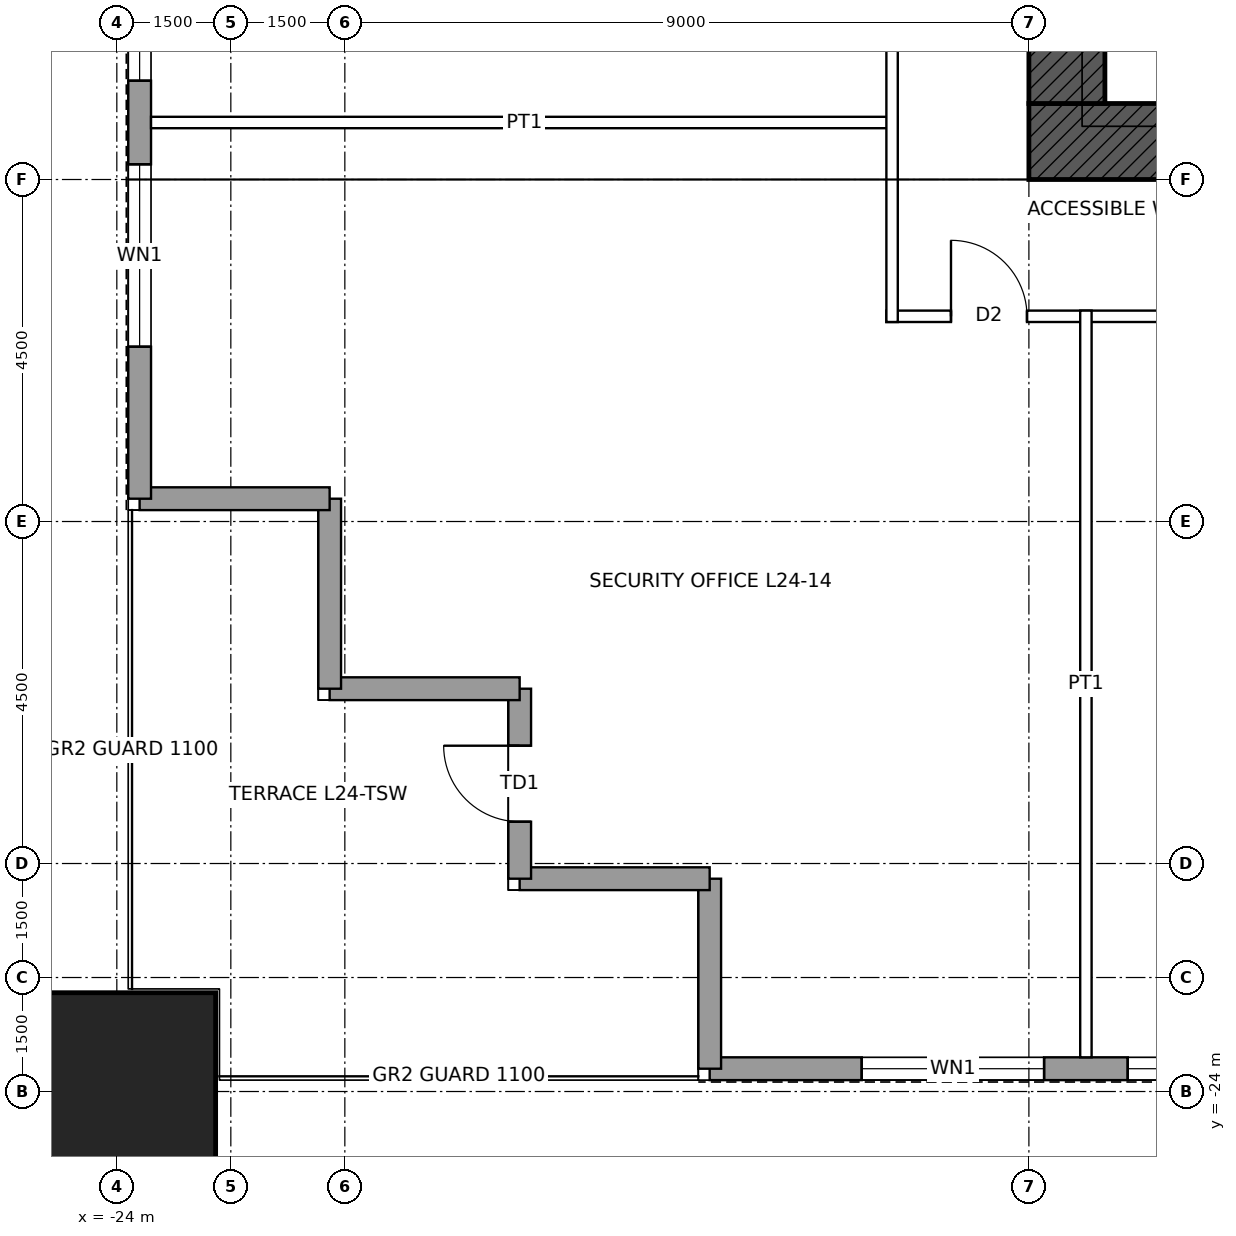
"""IFC4 building model, lengths in metres.
Left out: names, types, materials, properties, quantities, classifications, styles, units other than length and angle.
Written with IfcOpenShell. Run it as: python <this file> out.ifc"""

import sys

from ifc_helpers import new_model, si_unit, direction, frame, frame_2d, origin, origin_2d, place, context, subcontext, project, spatial, rectangle, hollow_rectangle, extrude, element, fill, save


model = new_model("IFC4")
c1 = context("Model", 3, precision=1e-05, world=origin(), true_north=direction((0.0, 1.0)))
c2 = subcontext(c1, "Body", "Model", "MODEL_VIEW")
j1 = project(units=[si_unit("LENGTHUNIT", "METRE"), si_unit("PLANEANGLEUNIT", "RADIAN")], contexts=[c1])
p1 = place(None, origin())
s1 = spatial("IfcSite", under=j1, at=p1, CompositionType="ELEMENT")
p2 = place(p1, origin())
s2 = spatial("IfcBuilding", under=s1, at=p2, CompositionType="ELEMENT")
p3 = place(p2, frame((0.0, 0.0, 122.4)))
s3 = spatial("IfcBuildingStorey", under=s2, at=p3, CompositionType="ELEMENT", Elevation=122.4)
p4 = place(p3, frame((-24.0, -24.0, 0.0), z_axis=(0.0, 0.0, 1.0), x_axis=(1.0, 0.0, 0.0)))
e1 = element("IfcColumn", 1, at=p4, inside=s3, PredefinedType="COLUMN", context=c2, shape_type="SweptSolid", body=[
    extrude(hollow_rectangle(XDim=2.6, YDim=2.6, WallThickness=0.13, at=origin_2d()), origin(), (0.0, 0.0, 1.0), 4.5),
])
p5 = place(p3, frame((12.0, -11.5, 0.0), z_axis=(0.0, 0.0, 1.0), x_axis=(-1.0, 0.0, 0.0)))
e2 = element("IfcWall", 2, at=p5, inside=s3, PredefinedType="SHEAR", context=c2, shape_type="SweptSolid", body=[
    extrude(rectangle(XDim=24.0, YDim=1.0, at=frame_2d((12.0, 0.0))), origin(), (0.0, 0.0, 1.0), 4.5),
])
p6 = place(p5, frame((11.5, 0.0, 0.0)))
e3 = element("IfcOpeningElement", 3, at=p6, cuts=e2, PredefinedType="OPENING", context=c2, shape_type="SweptSolid", body=[
    extrude(rectangle(XDim=1.0, YDim=2.1, at=frame_2d((0.5, 1.05))), frame((0.0, 0.51, 0.0), z_axis=(0.0, -1.0, 0.0), x_axis=(1.0, 0.0, 0.0)), (0.0, 0.0, 1.0), 1.02),
])
p7 = place(p5, frame((1.0, 0.0, 0.0)))
e4 = element("IfcOpeningElement", 4, at=p7, cuts=e2, PredefinedType="OPENING", context=c2, shape_type="SweptSolid", body=[
    extrude(rectangle(XDim=1.0, YDim=2.4, at=frame_2d((0.5, 1.2))), frame((0.0, 0.51, 0.0), z_axis=(0.0, -1.0, 0.0), x_axis=(1.0, 0.0, 0.0)), (0.0, 0.0, 1.0), 1.02),
])
p8 = place(p3, frame((-11.5, -11.0, 0.0), z_axis=(0.0, 0.0, 1.0), x_axis=(0.0, 1.0, 0.0)))
e5 = element("IfcWall", 5, at=p8, inside=s3, PredefinedType="SHEAR", context=c2, shape_type="SweptSolid", body=[
    extrude(rectangle(XDim=22.0, YDim=1.0, at=frame_2d((11.0, 0.0))), origin(), (0.0, 0.0, 1.0), 4.5),
])
p9 = place(p8, frame((10.5, 0.0, 0.0)))
e6 = element("IfcOpeningElement", 6, at=p9, cuts=e5, PredefinedType="OPENING", context=c2, shape_type="SweptSolid", body=[
    extrude(rectangle(XDim=1.0, YDim=2.4, at=frame_2d((0.5, 1.2))), frame((0.0, 0.51, 0.0), z_axis=(0.0, -1.0, 0.0), x_axis=(1.0, 0.0, 0.0)), (0.0, 0.0, 1.0), 1.02),
])
p10 = place(p3, frame((16.2, -23.7, 0.0), z_axis=(0.0, 0.0, 1.0), x_axis=(-1.0, 0.0, 0.0)))
e7 = element("IfcWall", 7, at=p10, inside=s3, PredefinedType="SOLIDWALL", context=c2, shape_type="SweptSolid", body=[
    extrude(rectangle(XDim=32.4, YDim=0.3, at=frame_2d((16.2, 0.0))), origin(), (0.0, 0.0, 1.0), 4.3),
])
p11 = place(p10, frame((2.0, 0.0, 1.0)))
e8 = element("IfcOpeningElement", 8, at=p11, cuts=e7, PredefinedType="OPENING", context=c2, shape_type="SweptSolid", body=[
    extrude(rectangle(XDim=2.4, YDim=1.2, at=frame_2d((1.2, 0.6))), frame((0.0, 0.16, 0.0), z_axis=(0.0, -1.0, 0.0), x_axis=(1.0, 0.0, 0.0)), (0.0, 0.0, 1.0), 0.32),
])
p12 = place(p10, frame((5.5, 0.0, 1.0)))
e9 = element("IfcOpeningElement", 9, at=p12, cuts=e7, PredefinedType="OPENING", context=c2, shape_type="SweptSolid", body=[
    extrude(rectangle(XDim=2.4, YDim=1.2, at=frame_2d((1.2, 0.6))), frame((0.0, 0.16, 0.0), z_axis=(0.0, -1.0, 0.0), x_axis=(1.0, 0.0, 0.0)), (0.0, 0.0, 1.0), 0.32),
])
p13 = place(p10, frame((8.6, 0.0, 1.0)))
e10 = element("IfcOpeningElement", 10, at=p13, cuts=e7, PredefinedType="OPENING", context=c2, shape_type="SweptSolid", body=[
    extrude(rectangle(XDim=2.4, YDim=1.2, at=frame_2d((1.2, 0.6))), frame((0.0, 0.16, 0.0), z_axis=(0.0, -1.0, 0.0), x_axis=(1.0, 0.0, 0.0)), (0.0, 0.0, 1.0), 0.32),
])
p14 = place(p10, frame((13.65, 0.0, 1.0)))
e11 = element("IfcOpeningElement", 11, at=p14, cuts=e7, PredefinedType="OPENING", context=c2, shape_type="SweptSolid", body=[
    extrude(rectangle(XDim=2.4, YDim=1.2, at=frame_2d((1.2, 0.6))), frame((0.0, 0.16, 0.0), z_axis=(0.0, -1.0, 0.0), x_axis=(1.0, 0.0, 0.0)), (0.0, 0.0, 1.0), 0.32),
])
p15 = place(p10, frame((16.35, 0.0, 1.0)))
e12 = element("IfcOpeningElement", 12, at=p15, cuts=e7, PredefinedType="OPENING", context=c2, shape_type="SweptSolid", body=[
    extrude(rectangle(XDim=2.4, YDim=1.2, at=frame_2d((1.2, 0.6))), frame((0.0, 0.16, 0.0), z_axis=(0.0, -1.0, 0.0), x_axis=(1.0, 0.0, 0.0)), (0.0, 0.0, 1.0), 0.32),
])
p16 = place(p10, frame((21.4, 0.0, 1.0)))
e13 = element("IfcOpeningElement", 13, at=p16, cuts=e7, PredefinedType="OPENING", context=c2, shape_type="SweptSolid", body=[
    extrude(rectangle(XDim=2.4, YDim=1.2, at=frame_2d((1.2, 0.6))), frame((0.0, 0.16, 0.0), z_axis=(0.0, -1.0, 0.0), x_axis=(1.0, 0.0, 0.0)), (0.0, 0.0, 1.0), 0.32),
])
p17 = place(p10, frame((24.5, 0.0, 1.0)))
e14 = element("IfcOpeningElement", 14, at=p17, cuts=e7, PredefinedType="OPENING", context=c2, shape_type="SweptSolid", body=[
    extrude(rectangle(XDim=2.4, YDim=1.2, at=frame_2d((1.2, 0.6))), frame((0.0, 0.16, 0.0), z_axis=(0.0, -1.0, 0.0), x_axis=(1.0, 0.0, 0.0)), (0.0, 0.0, 1.0), 0.32),
])
p18 = place(p10, frame((28.0, 0.0, 1.0)))
e15 = element("IfcOpeningElement", 15, at=p18, cuts=e7, PredefinedType="OPENING", context=c2, shape_type="SweptSolid", body=[
    extrude(rectangle(XDim=2.4, YDim=1.2, at=frame_2d((1.2, 0.6))), frame((0.0, 0.16, 0.0), z_axis=(0.0, -1.0, 0.0), x_axis=(1.0, 0.0, 0.0)), (0.0, 0.0, 1.0), 0.32),
])
for number, where, z_axis, x_axis in (
    (16, (-16.2, -23.7, 0.0), (0.0, 0.0, 1.0), (0.0, 1.0, 0.0)),
    (17, (-16.2, -21.2, 0.0), (0.0, 0.0, 1.0), (-1.0, 0.0, 0.0)),
):
    element("IfcWall", number, at=place(p3, frame(where, z_axis=z_axis, x_axis=x_axis)), inside=s3, PredefinedType="SOLIDWALL", context=c2, shape_type="SweptSolid", body=[
        extrude(rectangle(XDim=2.5, YDim=0.3, at=frame_2d((1.25, 0.0))), origin(), (0.0, 0.0, 1.0), 4.3),
    ])
p19 = place(p3, frame((-18.7, -21.2, 0.0), z_axis=(0.0, 0.0, 1.0), x_axis=(0.0, 1.0, 0.0)))
e18 = element("IfcWall", 18, at=p19, inside=s3, PredefinedType="SOLIDWALL", context=c2, shape_type="SweptSolid", body=[
    extrude(rectangle(XDim=2.5, YDim=0.3, at=frame_2d((1.25, 0.0))), origin(), (0.0, 0.0, 1.0), 4.3),
])
p20 = place(p19, frame((0.75, 0.0, 0.0)))
e19 = element("IfcOpeningElement", 19, at=p20, cuts=e18, PredefinedType="OPENING", context=c2, shape_type="SweptSolid", body=[
    extrude(rectangle(XDim=1.0, YDim=2.4, at=frame_2d((0.5, 1.2))), frame((0.0, 0.16, 0.0), z_axis=(0.0, -1.0, 0.0), x_axis=(1.0, 0.0, 0.0)), (0.0, 0.0, 1.0), 0.32),
])
for number, where, z_axis, x_axis in (
    (20, (-18.7, -18.7, 0.0), (0.0, 0.0, 1.0), (-1.0, 0.0, 0.0)),
    (21, (-21.2, -18.7, 0.0), (0.0, 0.0, 1.0), (0.0, 1.0, 0.0)),
    (22, (-21.2, -16.2, 0.0), (0.0, 0.0, 1.0), (-1.0, 0.0, 0.0)),
):
    element("IfcWall", number, at=place(p3, frame(where, z_axis=z_axis, x_axis=x_axis)), inside=s3, PredefinedType="SOLIDWALL", context=c2, shape_type="SweptSolid", body=[
        extrude(rectangle(XDim=2.5, YDim=0.3, at=frame_2d((1.25, 0.0))), origin(), (0.0, 0.0, 1.0), 4.3),
    ])
p21 = place(p3, frame((-23.7, -16.2, 0.0), z_axis=(0.0, 0.0, 1.0), x_axis=(0.0, 1.0, 0.0)))
e23 = element("IfcWall", 23, at=p21, inside=s3, PredefinedType="SOLIDWALL", context=c2, shape_type="SweptSolid", body=[
    extrude(rectangle(XDim=32.4, YDim=0.3, at=frame_2d((16.2, 0.0))), origin(), (0.0, 0.0, 1.0), 4.3),
])
p22 = place(p21, frame((2.0, 0.0, 1.0)))
e24 = element("IfcOpeningElement", 24, at=p22, cuts=e23, PredefinedType="OPENING", context=c2, shape_type="SweptSolid", body=[
    extrude(rectangle(XDim=2.4, YDim=1.2, at=frame_2d((1.2, 0.6))), frame((0.0, 0.16, 0.0), z_axis=(0.0, -1.0, 0.0), x_axis=(1.0, 0.0, 0.0)), (0.0, 0.0, 1.0), 0.32),
])
p23 = place(p21, frame((5.5, 0.0, 1.0)))
e25 = element("IfcOpeningElement", 25, at=p23, cuts=e23, PredefinedType="OPENING", context=c2, shape_type="SweptSolid", body=[
    extrude(rectangle(XDim=2.4, YDim=1.2, at=frame_2d((1.2, 0.6))), frame((0.0, 0.16, 0.0), z_axis=(0.0, -1.0, 0.0), x_axis=(1.0, 0.0, 0.0)), (0.0, 0.0, 1.0), 0.32),
])
p24 = place(p21, frame((8.6, 0.0, 1.0)))
e26 = element("IfcOpeningElement", 26, at=p24, cuts=e23, PredefinedType="OPENING", context=c2, shape_type="SweptSolid", body=[
    extrude(rectangle(XDim=2.4, YDim=1.2, at=frame_2d((1.2, 0.6))), frame((0.0, 0.16, 0.0), z_axis=(0.0, -1.0, 0.0), x_axis=(1.0, 0.0, 0.0)), (0.0, 0.0, 1.0), 0.32),
])
p25 = place(p21, frame((13.65, 0.0, 1.0)))
e27 = element("IfcOpeningElement", 27, at=p25, cuts=e23, PredefinedType="OPENING", context=c2, shape_type="SweptSolid", body=[
    extrude(rectangle(XDim=2.4, YDim=1.2, at=frame_2d((1.2, 0.6))), frame((0.0, 0.16, 0.0), z_axis=(0.0, -1.0, 0.0), x_axis=(1.0, 0.0, 0.0)), (0.0, 0.0, 1.0), 0.32),
])
p26 = place(p21, frame((16.35, 0.0, 1.0)))
e28 = element("IfcOpeningElement", 28, at=p26, cuts=e23, PredefinedType="OPENING", context=c2, shape_type="SweptSolid", body=[
    extrude(rectangle(XDim=2.4, YDim=1.2, at=frame_2d((1.2, 0.6))), frame((0.0, 0.16, 0.0), z_axis=(0.0, -1.0, 0.0), x_axis=(1.0, 0.0, 0.0)), (0.0, 0.0, 1.0), 0.32),
])
p27 = place(p21, frame((21.4, 0.0, 1.0)))
e29 = element("IfcOpeningElement", 29, at=p27, cuts=e23, PredefinedType="OPENING", context=c2, shape_type="SweptSolid", body=[
    extrude(rectangle(XDim=2.4, YDim=1.2, at=frame_2d((1.2, 0.6))), frame((0.0, 0.16, 0.0), z_axis=(0.0, -1.0, 0.0), x_axis=(1.0, 0.0, 0.0)), (0.0, 0.0, 1.0), 0.32),
])
p28 = place(p21, frame((24.5, 0.0, 1.0)))
e30 = element("IfcOpeningElement", 30, at=p28, cuts=e23, PredefinedType="OPENING", context=c2, shape_type="SweptSolid", body=[
    extrude(rectangle(XDim=2.4, YDim=1.2, at=frame_2d((1.2, 0.6))), frame((0.0, 0.16, 0.0), z_axis=(0.0, -1.0, 0.0), x_axis=(1.0, 0.0, 0.0)), (0.0, 0.0, 1.0), 0.32),
])
p29 = place(p21, frame((28.0, 0.0, 1.0)))
e31 = element("IfcOpeningElement", 31, at=p29, cuts=e23, PredefinedType="OPENING", context=c2, shape_type="SweptSolid", body=[
    extrude(rectangle(XDim=2.4, YDim=1.2, at=frame_2d((1.2, 0.6))), frame((0.0, 0.16, 0.0), z_axis=(0.0, -1.0, 0.0), x_axis=(1.0, 0.0, 0.0)), (0.0, 0.0, 1.0), 0.32),
])
p30 = place(p3, frame((-13.875, -13.8, 0.0), z_axis=(0.0, 0.0, 1.0), x_axis=(1.0, 0.0, 0.0)))
e32 = element("IfcWall", 32, at=p30, inside=s3, PredefinedType="PARTITIONING", context=c2, shape_type="SweptSolid", body=[
    extrude(rectangle(XDim=27.75, YDim=0.15, at=frame_2d((13.875, 0.0))), origin(), (0.0, 0.0, 1.0), 4.3),
])
p31 = place(p30, frame((20.475, 0.0, 0.0)))
e33 = element("IfcOpeningElement", 33, at=p31, cuts=e32, PredefinedType="OPENING", context=c2, shape_type="SweptSolid", body=[
    extrude(rectangle(XDim=1.8, YDim=2.4, at=frame_2d((0.9, 1.2))), frame((0.0, 0.085, 0.0), z_axis=(0.0, -1.0, 0.0), x_axis=(1.0, 0.0, 0.0)), (0.0, 0.0, 1.0), 0.17),
])
p32 = place(p30, frame((10.525, 0.0, 0.0)))
e34 = element("IfcOpeningElement", 34, at=p32, cuts=e32, PredefinedType="OPENING", context=c2, shape_type="SweptSolid", body=[
    extrude(rectangle(XDim=1.8, YDim=2.4, at=frame_2d((0.9, 1.2))), frame((0.0, 0.085, 0.0), z_axis=(0.0, -1.0, 0.0), x_axis=(1.0, 0.0, 0.0)), (0.0, 0.0, 1.0), 0.17),
])
p33 = place(p30, frame((5.475, 0.0, 0.0)))
e35 = element("IfcOpeningElement", 35, at=p33, cuts=e32, PredefinedType="OPENING", context=c2, shape_type="SweptSolid", body=[
    extrude(rectangle(XDim=1.8, YDim=2.4, at=frame_2d((0.9, 1.2))), frame((0.0, 0.085, 0.0), z_axis=(0.0, -1.0, 0.0), x_axis=(1.0, 0.0, 0.0)), (0.0, 0.0, 1.0), 0.17),
])
p34 = place(p30, frame((25.9, 0.0, 0.0)))
e36 = element("IfcOpeningElement", 36, at=p34, cuts=e32, PredefinedType="OPENING", context=c2, shape_type="SweptSolid", body=[
    extrude(rectangle(XDim=1.0, YDim=2.1, at=frame_2d((0.5, 1.05))), frame((0.0, 0.085, 0.0), z_axis=(0.0, -1.0, 0.0), x_axis=(1.0, 0.0, 0.0)), (0.0, 0.0, 1.0), 0.17),
])
p35 = place(p30, frame((0.85, 0.0, 0.0)))
e37 = element("IfcOpeningElement", 37, at=p35, cuts=e32, PredefinedType="OPENING", context=c2, shape_type="SweptSolid", body=[
    extrude(rectangle(XDim=1.0, YDim=2.1, at=frame_2d((0.5, 1.05))), frame((0.0, 0.085, 0.0), z_axis=(0.0, -1.0, 0.0), x_axis=(1.0, 0.0, 0.0)), (0.0, 0.0, 1.0), 0.17),
])
p36 = place(p3, frame((-23.55, -11.25, 0.0), z_axis=(0.0, 0.0, 1.0), x_axis=(1.0, 0.0, 0.0)))
e38 = element("IfcWall", 38, at=p36, inside=s3, PredefinedType="PARTITIONING", context=c2, shape_type="SweptSolid", body=[
    extrude(rectangle(XDim=9.825, YDim=0.15, at=frame_2d((4.913, 0.0))), origin(), (0.0, 0.0, 1.0), 3.431),
])
p37 = place(p3, frame((-13.8, -13.875, 0.0), z_axis=(0.0, 0.0, 1.0), x_axis=(0.0, 1.0, 0.0)))
e39 = element("IfcWall", 39, at=p37, inside=s3, PredefinedType="PARTITIONING", context=c2, shape_type="SweptSolid", body=[
    extrude(rectangle(XDim=27.75, YDim=0.15, at=frame_2d((13.875, 0.0))), origin(), (0.0, 0.0, 1.0), 4.3),
])
p38 = place(p37, frame((7.75, 0.0, 0.0)))
e40 = element("IfcOpeningElement", 40, at=p38, cuts=e39, PredefinedType="OPENING", context=c2, shape_type="SweptSolid", body=[
    extrude(rectangle(XDim=1.0, YDim=2.1, at=frame_2d((0.5, 1.05))), frame((0.0, 0.085, 0.0), z_axis=(0.0, -1.0, 0.0), x_axis=(1.0, 0.0, 0.0)), (0.0, 0.0, 1.0), 0.17),
])
p39 = place(p37, frame((18.6, 0.0, 0.0)))
e41 = element("IfcOpeningElement", 41, at=p39, cuts=e39, PredefinedType="OPENING", context=c2, shape_type="SweptSolid", body=[
    extrude(rectangle(XDim=1.8, YDim=2.4, at=frame_2d((0.9, 1.2))), frame((0.0, 0.085, 0.0), z_axis=(0.0, -1.0, 0.0), x_axis=(1.0, 0.0, 0.0)), (0.0, 0.0, 1.0), 0.17),
])
p40 = place(p3, frame((-11.25, -23.55, 0.0), z_axis=(0.0, 0.0, 1.0), x_axis=(0.0, 1.0, 0.0)))
e42 = element("IfcWall", 42, at=p40, inside=s3, PredefinedType="PARTITIONING", context=c2, shape_type="SweptSolid", body=[
    extrude(rectangle(XDim=9.825, YDim=0.15, at=frame_2d((4.913, 0.0))), origin(), (0.0, 0.0, 1.0), 3.431),
])
p41 = place(p17, origin())
e43 = element("IfcWindow", 43, at=p41, inside=s3, PartitioningType="SINGLE_PANEL", PredefinedType="WINDOW", context=c2, shape_type="SweptSolid", body=[
    extrude(rectangle(XDim=2.4, YDim=1.2, at=frame_2d((1.2, 0.6))), frame((0.0, 0.03, 0.0), z_axis=(0.0, -1.0, 0.0), x_axis=(1.0, 0.0, 0.0)), (0.0, 0.0, 1.0), 0.06),
])
fill(e14, e43)
p42 = place(p18, origin())
e44 = element("IfcWindow", 44, at=p42, inside=s3, PartitioningType="SINGLE_PANEL", PredefinedType="WINDOW", context=c2, shape_type="SweptSolid", body=[
    extrude(rectangle(XDim=2.4, YDim=1.2, at=frame_2d((1.2, 0.6))), frame((0.0, 0.03, 0.0), z_axis=(0.0, -1.0, 0.0), x_axis=(1.0, 0.0, 0.0)), (0.0, 0.0, 1.0), 0.06),
])
fill(e15, e44)
p43 = place(p20, origin())
e45 = element("IfcDoor", 45, at=p43, inside=s3, OperationType="SINGLE_SWING_RIGHT", PredefinedType="DOOR", context=c2, shape_type="SweptSolid", body=[
    extrude(rectangle(XDim=1.0, YDim=2.4, at=frame_2d((0.5, 1.2))), frame((0.0, 0.025, 0.0), z_axis=(0.0, -1.0, 0.0), x_axis=(1.0, 0.0, 0.0)), (0.0, 0.0, 1.0), 0.05),
])
fill(e19, e45)
p44 = place(p22, origin())
e46 = element("IfcWindow", 46, at=p44, inside=s3, PartitioningType="SINGLE_PANEL", PredefinedType="WINDOW", context=c2, shape_type="SweptSolid", body=[
    extrude(rectangle(XDim=2.4, YDim=1.2, at=frame_2d((1.2, 0.6))), frame((0.0, 0.03, 0.0), z_axis=(0.0, -1.0, 0.0), x_axis=(1.0, 0.0, 0.0)), (0.0, 0.0, 1.0), 0.06),
])
fill(e24, e46)
p45 = place(p23, origin())
e47 = element("IfcWindow", 47, at=p45, inside=s3, PartitioningType="SINGLE_PANEL", PredefinedType="WINDOW", context=c2, shape_type="SweptSolid", body=[
    extrude(rectangle(XDim=2.4, YDim=1.2, at=frame_2d((1.2, 0.6))), frame((0.0, 0.03, 0.0), z_axis=(0.0, -1.0, 0.0), x_axis=(1.0, 0.0, 0.0)), (0.0, 0.0, 1.0), 0.06),
])
fill(e25, e47)
p46 = place(p35, origin())
e48 = element("IfcDoor", 48, at=p46, inside=s3, OperationType="SINGLE_SWING_LEFT", PredefinedType="DOOR", context=c2, shape_type="SweptSolid", body=[
    extrude(rectangle(XDim=1.0, YDim=2.1, at=frame_2d((0.5, 1.05))), frame((0.0, 0.025, 0.0), z_axis=(0.0, -1.0, 0.0), x_axis=(1.0, 0.0, 0.0)), (0.0, 0.0, 1.0), 0.05),
])
fill(e37, e48)
save(model, sys.argv[1])
